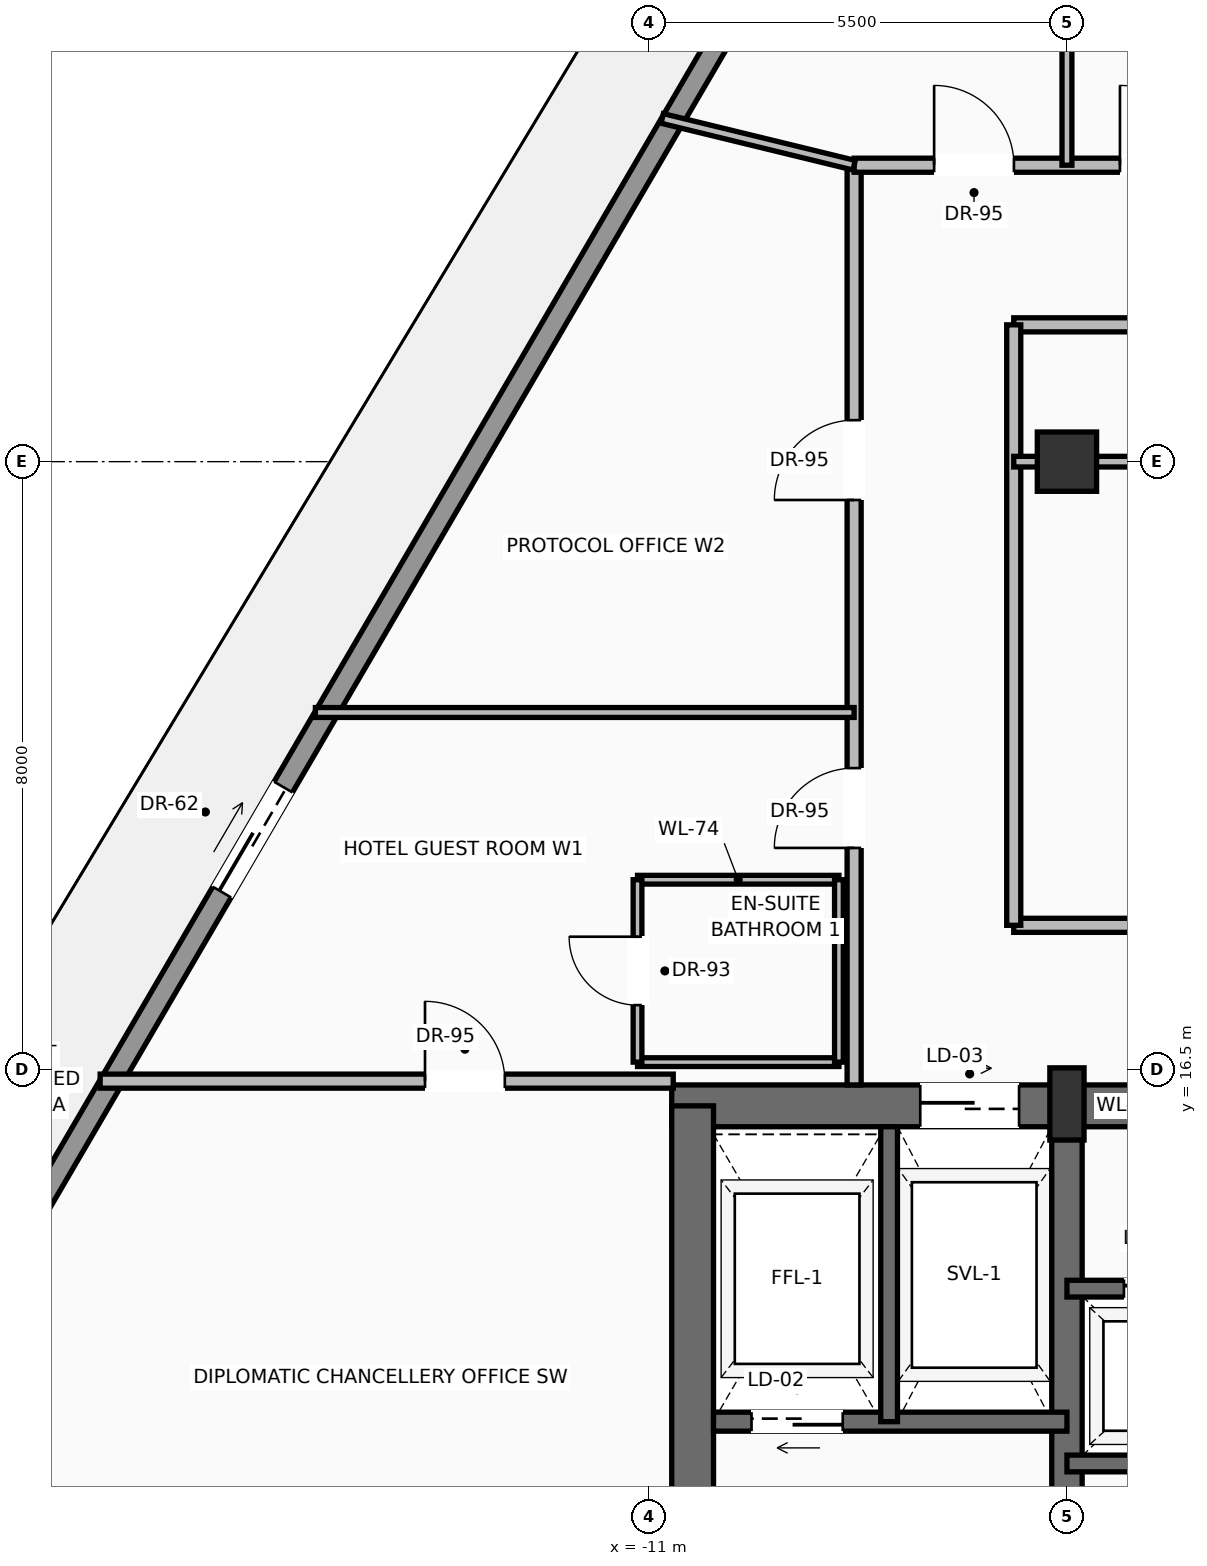
"""IFC4 building model, lengths in metres.
Left out: names, types, materials, properties, quantities, classifications, styles, units other than length and angle.
Written with IfcOpenShell. Run it as: python <this file> out.ifc"""

import sys

from ifc_helpers import new_model, si_unit, direction, frame, frame_2d, origin, origin_2d, place, context, subcontext, project, spatial, rectangle, extrude, source, transform, mapped, element, fill, save


model = new_model("IFC4")
c1 = context("Model", 3, precision=1e-05, world=origin(), true_north=direction((0.0, 1.0)))
c2 = subcontext(c1, "Body", "Model", "MODEL_VIEW")
j1 = project(units=[si_unit("LENGTHUNIT", "METRE"), si_unit("PLANEANGLEUNIT", "RADIAN")], contexts=[c1])
p1 = place(None, origin())
s1 = spatial("IfcSite", under=j1, at=p1, CompositionType="ELEMENT")
p2 = place(p1, origin())
s2 = spatial("IfcBuilding", under=s1, at=p2, CompositionType="ELEMENT")
p3 = place(p2, frame((0.0, 0.0, 254.5)))
s3 = spatial("IfcBuildingStorey", under=s2, at=p3, CompositionType="ELEMENT", Elevation=254.5)
p4 = place(p3, frame((-10.7, 16.025, 0.0), z_axis=(0.0, 0.0, 1.0), x_axis=(1.0, 0.0, 0.0)))
e1 = element("IfcWall", 1, at=p4, inside=s3, PredefinedType="SHEAR", context=c2, shape_type="SweptSolid", body=[
    extrude(rectangle(XDim=21.4, YDim=0.55, at=frame_2d((10.7, 0.0))), origin(), (0.0, 0.0, 1.0), 3.15),
])
p5 = place(p4, frame((3.27, 0.0, 0.0)))
e2 = element("IfcOpeningElement", 2, at=p5, cuts=e1, PredefinedType="OPENING", context=c2, shape_type="SweptSolid", body=[
    extrude(rectangle(XDim=1.3, YDim=2.3, at=frame_2d((0.65, 1.15))), frame((0.0, 0.285, 0.0), z_axis=(0.0, -1.0, 0.0), x_axis=(1.0, 0.0, 0.0)), (0.0, 0.0, 1.0), 0.57),
])
p6 = place(p4, frame((9.7, 0.0, 0.0)))
e3 = element("IfcOpeningElement", 3, at=p6, cuts=e1, PredefinedType="OPENING", context=c2, shape_type="SweptSolid", body=[
    extrude(rectangle(XDim=2.0, YDim=2.4, at=frame_2d((1.0, 1.2))), frame((0.0, 0.285, 0.0), z_axis=(0.0, -1.0, 0.0), x_axis=(1.0, 0.0, 0.0)), (0.0, 0.0, 1.0), 0.57),
])
p7 = place(p3, frame((-10.425, 0.575, 0.0), z_axis=(0.0, 0.0, 1.0), x_axis=(0.0, 1.0, 0.0)))
e4 = element("IfcWall", 4, at=p7, inside=s3, PredefinedType="SHEAR", context=c2, shape_type="SweptSolid", body=[
    extrude(rectangle(XDim=15.45, YDim=0.55, at=frame_2d((7.725, 0.0))), origin(), (0.0, 0.0, 1.0), 3.15),
])
p8 = place(p3, frame((-5.5, 0.575, 0.0), z_axis=(0.0, 0.0, 1.0), x_axis=(0.0, 1.0, 0.0)))
e5 = element("IfcWall", 5, at=p8, inside=s3, PredefinedType="SHEAR", context=c2, shape_type="SweptSolid", body=[
    extrude(rectangle(XDim=15.45, YDim=0.4, at=frame_2d((7.725, 0.0))), origin(), (0.0, 0.0, 1.0), 3.15),
])
p9 = place(p8, frame((8.925, 0.0, 0.0)))
e6 = element("IfcOpeningElement", 6, at=p9, cuts=e5, PredefinedType="OPENING", context=c2, shape_type="SweptSolid", body=[
    extrude(rectangle(XDim=1.1, YDim=2.2, at=frame_2d((0.55, 1.1))), frame((0.0, 0.21, 0.0), z_axis=(0.0, -1.0, 0.0), x_axis=(1.0, 0.0, 0.0)), (0.0, 0.0, 1.0), 0.42),
])
m1 = source(origin(), c2, "Body", "SweptSolid", [
    extrude(rectangle(XDim=0.45, YDim=0.95, at=origin_2d()), origin(), (0.0, 0.0, 1.0), 3.45),
])
p10 = place(p3, frame((-5.5, 16.05, 0.0), z_axis=(0.0, 0.0, 1.0), x_axis=(1.0, 0.0, 0.0)))
e7 = element("IfcColumn", 7, at=p10, inside=s3, PredefinedType="PILASTER", context=c2, shape_type="MappedRepresentation", body=[
    mapped(m1, transform((0.0, 0.0, 0.0), scale=1.0)),
])
m2 = source(origin(), c2, "Body", "SweptSolid", [
    extrude(rectangle(XDim=0.78, YDim=0.78, at=origin_2d()), origin(), (0.0, 0.0, 1.0), 3.45),
])
p11 = place(p3, frame((-5.5, 24.5, 0.0), z_axis=(0.0, 0.0, 1.0), x_axis=(1.0, 0.0, 0.0)))
e8 = element("IfcColumn", 8, at=p11, inside=s3, PredefinedType="COLUMN", context=c2, shape_type="MappedRepresentation", body=[
    mapped(m2, transform((0.0, 0.0, 0.0), scale=1.0)),
])
p12 = place(p3, frame((-19.013, 14.734, 0.0), z_axis=(0.0, 0.0, 1.0), x_axis=(0.504219118022, 0.863575752914, 0.0)))
e9 = element("IfcWall", 9, at=p12, inside=s3, PredefinedType="SOLIDWALL", context=c2, shape_type="SweptSolid", body=[
    extrude(rectangle(XDim=19.796, YDim=0.28, at=frame_2d((9.898, 0.0))), origin(), (0.0, 0.0, 1.0), 2.73),
])
p13 = place(p12, frame((4.751, 0.0, 0.0)))
e10 = element("IfcOpeningElement", 10, at=p13, cuts=e9, PredefinedType="OPENING", context=c2, shape_type="SweptSolid", body=[
    extrude(rectangle(XDim=1.6, YDim=2.35, at=frame_2d((0.8, 1.175))), frame((0.0, 0.15, 0.0), z_axis=(0.0, -1.0, 0.0), x_axis=(1.0, 0.0, 0.0)), (0.0, 0.0, 1.0), 0.3),
])
p14 = place(p3, frame((-5.5, 11.87, 0.0), z_axis=(0.0, 0.0, 1.0), x_axis=(-1.0, 0.0, 0.0)))
e11 = element("IfcWall", 11, at=p14, inside=s3, PredefinedType="SOLIDWALL", context=c2, shape_type="SweptSolid", body=[
    extrude(rectangle(XDim=4.65, YDim=0.25, at=frame_2d((2.325, 0.0))), origin(), (0.0, 0.0, 1.0), 3.15),
])
p15 = place(p14, frame((2.95, 0.0, 0.0)))
e12 = element("IfcOpeningElement", 12, at=p15, cuts=e11, PredefinedType="OPENING", context=c2, shape_type="SweptSolid", body=[
    extrude(rectangle(XDim=1.2, YDim=2.25, at=frame_2d((0.6, 1.125))), frame((0.0, 0.135, 0.0), z_axis=(0.0, -1.0, 0.0), x_axis=(1.0, 0.0, 0.0)), (0.0, 0.0, 1.0), 0.27),
])
p16 = place(p3, frame((-7.84, 11.87, 0.0), z_axis=(0.0, 0.0, 1.0), x_axis=(0.0, 1.0, 0.0)))
e13 = element("IfcWall", 13, at=p16, inside=s3, PredefinedType="SOLIDWALL", context=c2, shape_type="SweptSolid", body=[
    extrude(rectangle(XDim=3.88, YDim=0.22, at=frame_2d((1.94, 0.0))), origin(), (0.0, 0.0, 1.0), 3.15),
])
p17 = place(p3, frame((-5.5, 11.32, 0.0), z_axis=(0.0, 0.0, 1.0), x_axis=(1.0, 0.0, 0.0)))
e14 = element("IfcWall", 14, at=p17, inside=s3, PredefinedType="SOLIDWALL", context=c2, shape_type="SweptSolid", body=[
    extrude(rectangle(XDim=7.32, YDim=0.22, at=frame_2d((3.66, 0.0))), origin(), (0.0, 0.0, 1.0), 3.15),
])
p18 = place(p3, frame((-5.5, 13.62, 0.0), z_axis=(0.0, 0.0, 1.0), x_axis=(1.0, 0.0, 0.0)))
e15 = element("IfcWall", 15, at=p18, inside=s3, PredefinedType="SOLIDWALL", context=c2, shape_type="SweptSolid", body=[
    extrude(rectangle(XDim=7.32, YDim=0.22, at=frame_2d((3.66, 0.0))), origin(), (0.0, 0.0, 1.0), 3.15),
])
p19 = place(p18, frame((0.75, 0.0, 0.0)))
e16 = element("IfcOpeningElement", 16, at=p19, cuts=e15, PredefinedType="OPENING", context=c2, shape_type="SweptSolid", body=[
    extrude(rectangle(XDim=1.1, YDim=2.2, at=frame_2d((0.55, 1.1))), frame((0.0, 0.12, 0.0), z_axis=(0.0, -1.0, 0.0), x_axis=(1.0, 0.0, 0.0)), (0.0, 0.0, 1.0), 0.24),
])
p20 = place(p18, frame((3.15, 0.0, 0.0)))
e17 = element("IfcOpeningElement", 17, at=p20, cuts=e15, PredefinedType="OPENING", context=c2, shape_type="SweptSolid", body=[
    extrude(rectangle(XDim=1.1, YDim=2.2, at=frame_2d((0.55, 1.1))), frame((0.0, 0.12, 0.0), z_axis=(0.0, -1.0, 0.0), x_axis=(1.0, 0.0, 0.0)), (0.0, 0.0, 1.0), 0.24),
])
p21 = place(p18, frame((5.55, 0.0, 0.0)))
e18 = element("IfcOpeningElement", 18, at=p21, cuts=e15, PredefinedType="OPENING", context=c2, shape_type="SweptSolid", body=[
    extrude(rectangle(XDim=1.1, YDim=2.2, at=frame_2d((0.55, 1.1))), frame((0.0, 0.12, 0.0), z_axis=(0.0, -1.0, 0.0), x_axis=(1.0, 0.0, 0.0)), (0.0, 0.0, 1.0), 0.24),
])
p22 = place(p3, frame((-6.2, 18.4, 0.0), z_axis=(0.0, 0.0, 1.0), x_axis=(1.0, 0.0, 0.0)))
e19 = element("IfcWall", 19, at=p22, inside=s3, PredefinedType="PARTITIONING", context=c2, shape_type="SweptSolid", body=[
    extrude(rectangle(XDim=12.6, YDim=0.185, at=frame_2d((6.3, 0.0))), origin(), (0.0, 0.0, 1.0), 3.142),
])
p23 = place(p22, frame((5.825, 0.0, 0.0)))
e20 = element("IfcOpeningElement", 20, at=p23, cuts=e19, PredefinedType="OPENING", context=c2, shape_type="SweptSolid", body=[
    extrude(rectangle(XDim=0.95, YDim=2.2, at=frame_2d((0.475, 1.1))), frame((0.0, 0.103, 0.0), z_axis=(0.0, -1.0, 0.0), x_axis=(1.0, 0.0, 0.0)), (0.0, 0.0, 1.0), 0.205),
])
p24 = place(p3, frame((-6.2, 26.3, 0.0), z_axis=(0.0, 0.0, 1.0), x_axis=(1.0, 0.0, 0.0)))
e21 = element("IfcWall", 21, at=p24, inside=s3, PredefinedType="PARTITIONING", context=c2, shape_type="SweptSolid", body=[
    extrude(rectangle(XDim=12.6, YDim=0.185, at=frame_2d((6.3, 0.0))), origin(), (0.0, 0.0, 1.0), 3.142),
])
p25 = place(p24, frame((5.825, 0.0, 0.0)))
e22 = element("IfcOpeningElement", 22, at=p25, cuts=e21, PredefinedType="OPENING", context=c2, shape_type="SweptSolid", body=[
    extrude(rectangle(XDim=0.95, YDim=2.2, at=frame_2d((0.475, 1.1))), frame((0.0, 0.103, 0.0), z_axis=(0.0, -1.0, 0.0), x_axis=(1.0, 0.0, 0.0)), (0.0, 0.0, 1.0), 0.205),
])
p26 = place(p3, frame((-6.2, 18.4, 0.0), z_axis=(0.0, 0.0, 1.0), x_axis=(0.0, 1.0, 0.0)))
e23 = element("IfcWall", 23, at=p26, inside=s3, PredefinedType="PARTITIONING", context=c2, shape_type="SweptSolid", body=[
    extrude(rectangle(XDim=7.9, YDim=0.185, at=frame_2d((3.95, 0.0))), origin(), (0.0, 0.0, 1.0), 3.142),
])
p27 = place(p3, frame((-8.3, 16.3, 0.0), z_axis=(0.0, 0.0, 1.0), x_axis=(0.0, 1.0, 0.0)))
e24 = element("IfcWall", 24, at=p27, inside=s3, PredefinedType="PARTITIONING", context=c2, shape_type="SweptSolid", body=[
    extrude(rectangle(XDim=12.1, YDim=0.185, at=frame_2d((6.05, 0.0))), origin(), (0.0, 0.0, 1.0), 3.142),
])
p28 = place(p27, frame((3.118, 0.0, 0.0)))
e25 = element("IfcOpeningElement", 25, at=p28, cuts=e24, PredefinedType="OPENING", context=c2, shape_type="SweptSolid", body=[
    extrude(rectangle(XDim=1.05, YDim=2.25, at=frame_2d((0.525, 1.125))), frame((0.0, 0.103, 0.0), z_axis=(0.0, -1.0, 0.0), x_axis=(1.0, 0.0, 0.0)), (0.0, 0.0, 1.0), 0.205),
])
p29 = place(p27, frame((7.696, 0.0, 0.0)))
e26 = element("IfcOpeningElement", 26, at=p29, cuts=e24, PredefinedType="OPENING", context=c2, shape_type="SweptSolid", body=[
    extrude(rectangle(XDim=1.05, YDim=2.25, at=frame_2d((0.525, 1.125))), frame((0.0, 0.103, 0.0), z_axis=(0.0, -1.0, 0.0), x_axis=(1.0, 0.0, 0.0)), (0.0, 0.0, 1.0), 0.205),
])
p30 = place(p3, frame((-8.3, 28.4, 0.0), z_axis=(0.0, 0.0, 1.0), x_axis=(1.0, 0.0, 0.0)))
e27 = element("IfcWall", 27, at=p30, inside=s3, PredefinedType="PARTITIONING", context=c2, shape_type="SweptSolid", body=[
    extrude(rectangle(XDim=16.8, YDim=0.185, at=frame_2d((8.4, 0.0))), origin(), (0.0, 0.0, 1.0), 3.142),
])
p31 = place(p30, frame((3.498, 0.0, 0.0)))
e28 = element("IfcOpeningElement", 28, at=p31, cuts=e27, PredefinedType="OPENING", context=c2, shape_type="SweptSolid", body=[
    extrude(rectangle(XDim=1.05, YDim=2.25, at=frame_2d((0.525, 1.125))), frame((0.0, 0.103, 0.0), z_axis=(0.0, -1.0, 0.0), x_axis=(1.0, 0.0, 0.0)), (0.0, 0.0, 1.0), 0.205),
])
p32 = place(p30, frame((8.998, 0.0, 0.0)))
e29 = element("IfcOpeningElement", 29, at=p32, cuts=e27, PredefinedType="OPENING", context=c2, shape_type="SweptSolid", body=[
    extrude(rectangle(XDim=1.05, YDim=2.25, at=frame_2d((0.525, 1.125))), frame((0.0, 0.103, 0.0), z_axis=(0.0, -1.0, 0.0), x_axis=(1.0, 0.0, 0.0)), (0.0, 0.0, 1.0), 0.205),
])
p33 = place(p30, frame((12.052, 0.0, 0.0)))
e30 = element("IfcOpeningElement", 30, at=p33, cuts=e27, PredefinedType="OPENING", context=c2, shape_type="SweptSolid", body=[
    extrude(rectangle(XDim=1.05, YDim=2.25, at=frame_2d((0.525, 1.125))), frame((0.0, 0.103, 0.0), z_axis=(0.0, -1.0, 0.0), x_axis=(1.0, 0.0, 0.0)), (0.0, 0.0, 1.0), 0.205),
])
p34 = place(p30, frame((14.498, 0.0, 0.0)))
e31 = element("IfcOpeningElement", 31, at=p34, cuts=e27, PredefinedType="OPENING", context=c2, shape_type="SweptSolid", body=[
    extrude(rectangle(XDim=1.05, YDim=2.25, at=frame_2d((0.525, 1.125))), frame((0.0, 0.103, 0.0), z_axis=(0.0, -1.0, 0.0), x_axis=(1.0, 0.0, 0.0)), (0.0, 0.0, 1.0), 0.205),
])
p35 = place(p30, frame((1.052, 0.0, 0.0)))
e32 = element("IfcOpeningElement", 32, at=p35, cuts=e27, PredefinedType="OPENING", context=c2, shape_type="SweptSolid", body=[
    extrude(rectangle(XDim=1.05, YDim=2.25, at=frame_2d((0.525, 1.125))), frame((0.0, 0.103, 0.0), z_axis=(0.0, -1.0, 0.0), x_axis=(1.0, 0.0, 0.0)), (0.0, 0.0, 1.0), 0.205),
])
p36 = place(p3, frame((-6.2, 24.5, 0.0), z_axis=(0.0, 0.0, 1.0), x_axis=(1.0, 0.0, 0.0)))
e33 = element("IfcWall", 33, at=p36, inside=s3, PredefinedType="PARTITIONING", context=c2, shape_type="SweptSolid", body=[
    extrude(rectangle(XDim=12.6, YDim=0.14, at=frame_2d((6.3, 0.0))), origin(), (0.0, 0.0, 1.0), 2.593),
])
p37 = place(p3, frame((-18.22, 16.35, 0.0), z_axis=(0.0, 0.0, 1.0), x_axis=(1.0, 0.0, 0.0)))
e34 = element("IfcWall", 34, at=p37, inside=s3, PredefinedType="PARTITIONING", context=c2, shape_type="SweptSolid", body=[
    extrude(rectangle(XDim=7.54, YDim=0.185, at=frame_2d((3.77, 0.0))), origin(), (0.0, 0.0, 1.0), 3.142),
])
p38 = place(p37, frame((4.274, 0.0, 0.0)))
e35 = element("IfcOpeningElement", 35, at=p38, cuts=e34, PredefinedType="OPENING", context=c2, shape_type="SweptSolid", body=[
    extrude(rectangle(XDim=1.05, YDim=2.25, at=frame_2d((0.525, 1.125))), frame((0.0, 0.103, 0.0), z_axis=(0.0, -1.0, 0.0), x_axis=(1.0, 0.0, 0.0)), (0.0, 0.0, 1.0), 0.205),
])
p39 = place(p3, frame((-10.825, 29.015, 0.0), z_axis=(0.0, 0.0, 1.0), x_axis=(0.971578327302, -0.236718300764, 0.0)))
e36 = element("IfcWall", 36, at=p39, inside=s3, PredefinedType="PARTITIONING", context=c2, shape_type="SweptSolid", body=[
    extrude(rectangle(XDim=2.599, YDim=0.13, at=frame_2d((1.3, 0.0))), origin(), (0.0, 0.0, 1.0), 3.142),
])
p40 = place(p3, frame((-5.5, 28.4, 0.0), z_axis=(0.0, 0.0, 1.0), x_axis=(0.0, 1.0, 0.0)))
e37 = element("IfcWall", 37, at=p40, inside=s3, PredefinedType="PARTITIONING", context=c2, shape_type="SweptSolid", body=[
    extrude(rectangle(XDim=9.736, YDim=0.13, at=frame_2d((4.868, 0.0))), origin(), (0.0, 0.0, 1.0), 2.593),
])
for number, where, z_axis, x_axis in (
    (38, (-11.15, 16.6, 0.0), (0.0, 0.0, 1.0), (1.0, 0.0, 0.0)),
    (39, (-11.15, 19.0, 0.0), (0.0, 0.0, 1.0), (1.0, 0.0, 0.0)),
):
    element("IfcWall", number, at=place(p3, frame(where, z_axis=z_axis, x_axis=x_axis)), inside=s3, PredefinedType="PARTITIONING", context=c2, shape_type="SweptSolid", body=[
        extrude(rectangle(XDim=2.65, YDim=0.115, at=frame_2d((1.325, 0.0))), origin(), (0.0, 0.0, 1.0), 3.142),
    ])
p41 = place(p3, frame((-11.15, 16.6, 0.0), z_axis=(0.0, 0.0, 1.0), x_axis=(0.0, 1.0, 0.0)))
e40 = element("IfcWall", 40, at=p41, inside=s3, PredefinedType="PARTITIONING", context=c2, shape_type="SweptSolid", body=[
    extrude(rectangle(XDim=2.4, YDim=0.115, at=frame_2d((1.2, 0.0))), origin(), (0.0, 0.0, 1.0), 3.142),
])
p42 = place(p41, frame((0.75, 0.0, 0.0)))
e41 = element("IfcOpeningElement", 41, at=p42, cuts=e40, PredefinedType="OPENING", context=c2, shape_type="SweptSolid", body=[
    extrude(rectangle(XDim=0.9, YDim=2.15, at=frame_2d((0.45, 1.075))), frame((0.0, 0.067, 0.0), z_axis=(0.0, -1.0, 0.0), x_axis=(1.0, 0.0, 0.0)), (0.0, 0.0, 1.0), 0.135),
])
p43 = place(p3, frame((-8.5, 16.6, 0.0), z_axis=(0.0, 0.0, 1.0), x_axis=(0.0, 1.0, 0.0)))
e42 = element("IfcWall", 42, at=p43, inside=s3, PredefinedType="PARTITIONING", context=c2, shape_type="SweptSolid", body=[
    extrude(rectangle(XDim=2.4, YDim=0.115, at=frame_2d((1.2, 0.0))), origin(), (0.0, 0.0, 1.0), 3.142),
])
p44 = place(p3, frame((-15.388, 21.2, 0.0), z_axis=(0.0, 0.0, 1.0), x_axis=(1.0, 0.0, 0.0)))
e43 = element("IfcWall", 43, at=p44, inside=s3, PredefinedType="PARTITIONING", context=c2, shape_type="SweptSolid", body=[
    extrude(rectangle(XDim=7.088, YDim=0.13, at=frame_2d((3.544, 0.0))), origin(), (0.0, 0.0, 1.0), 3.142),
])
m3 = source(origin(), c2, "Body", "SweptSolid", [
    extrude(rectangle(XDim=1.6, YDim=2.35, at=frame_2d((0.8, 1.175))), frame((0.0, 0.025, 0.0), z_axis=(0.0, -1.0, 0.0), x_axis=(1.0, 0.0, 0.0)), (0.0, 0.0, 1.0), 0.05),
])
p45 = place(p13, origin())
e44 = element("IfcDoor", 44, at=p45, inside=s3, OperationType="SLIDING_TO_LEFT", PredefinedType="DOOR", context=c2, shape_type="MappedRepresentation", body=[
    mapped(m3, transform((0.0, 0.0, 0.0), scale=1.0)),
])
fill(e10, e44)
m4 = source(origin(), c2, "Body", "SweptSolid", [
    extrude(rectangle(XDim=1.2, YDim=2.25, at=frame_2d((0.6, 1.125))), frame((0.0, 0.025, 0.0), z_axis=(0.0, -1.0, 0.0), x_axis=(1.0, 0.0, 0.0)), (0.0, 0.0, 1.0), 0.05),
])
p46 = place(p15, origin())
e45 = element("IfcDoor", 45, at=p46, inside=s3, OperationType="SLIDING_TO_LEFT", PredefinedType="DOOR", context=c2, shape_type="MappedRepresentation", body=[
    mapped(m4, transform((0.0, 0.0, 0.0), scale=1.0)),
])
fill(e12, e45)
m5 = source(origin(), c2, "Body", "SweptSolid", [
    extrude(rectangle(XDim=1.3, YDim=2.3, at=frame_2d((0.65, 1.15))), frame((0.0, 0.025, 0.0), z_axis=(0.0, -1.0, 0.0), x_axis=(1.0, 0.0, 0.0)), (0.0, 0.0, 1.0), 0.05),
])
p47 = place(p5, origin())
e46 = element("IfcDoor", 46, at=p47, inside=s3, OperationType="SLIDING_TO_RIGHT", PredefinedType="DOOR", context=c2, shape_type="MappedRepresentation", body=[
    mapped(m5, transform((0.0, 0.0, 0.0), scale=1.0)),
])
fill(e2, e46)
m6 = source(origin(), c2, "Body", "SweptSolid", [
    extrude(rectangle(XDim=1.1, YDim=2.2, at=frame_2d((0.55, 1.1))), frame((0.0, 0.025, 0.0), z_axis=(0.0, -1.0, 0.0), x_axis=(1.0, 0.0, 0.0)), (0.0, 0.0, 1.0), 0.05),
])
p48 = place(p19, origin())
e47 = element("IfcDoor", 47, at=p48, inside=s3, OperationType="SLIDING_TO_RIGHT", PredefinedType="DOOR", context=c2, shape_type="MappedRepresentation", body=[
    mapped(m6, transform((0.0, 0.0, 0.0), scale=1.0)),
])
fill(e16, e47)
m7 = source(origin(), c2, "Body", "SweptSolid", [
    extrude(rectangle(XDim=1.05, YDim=2.25, at=frame_2d((0.525, 1.125))), frame((0.0, 0.025, 0.0), z_axis=(0.0, -1.0, 0.0), x_axis=(1.0, 0.0, 0.0)), (0.0, 0.0, 1.0), 0.05),
])
p49 = place(p38, origin())
e48 = element("IfcDoor", 48, at=p49, inside=s3, OperationType="SINGLE_SWING_LEFT", PredefinedType="DOOR", context=c2, shape_type="MappedRepresentation", body=[
    mapped(m7, transform((0.0, 0.0, 0.0), scale=1.0)),
])
fill(e35, e48)
p50 = place(p28, origin())
e49 = element("IfcDoor", 49, at=p50, inside=s3, OperationType="SINGLE_SWING_LEFT", PredefinedType="DOOR", context=c2, shape_type="MappedRepresentation", body=[
    mapped(m7, transform((0.0, 0.0, 0.0), scale=1.0)),
])
fill(e25, e49)
m8 = source(origin(), c2, "Body", "SweptSolid", [
    extrude(rectangle(XDim=0.9, YDim=2.15, at=frame_2d((0.45, 1.075))), frame((0.0, 0.025, 0.0), z_axis=(0.0, -1.0, 0.0), x_axis=(1.0, 0.0, 0.0)), (0.0, 0.0, 1.0), 0.05),
])
p51 = place(p42, origin())
e50 = element("IfcDoor", 50, at=p51, inside=s3, OperationType="SINGLE_SWING_RIGHT", PredefinedType="DOOR", context=c2, shape_type="MappedRepresentation", body=[
    mapped(m8, transform((0.0, 0.0, 0.0), scale=1.0)),
])
fill(e41, e50)
p52 = place(p29, origin())
e51 = element("IfcDoor", 51, at=p52, inside=s3, OperationType="SINGLE_SWING_LEFT", PredefinedType="DOOR", context=c2, shape_type="MappedRepresentation", body=[
    mapped(m7, transform((0.0, 0.0, 0.0), scale=1.0)),
])
fill(e26, e51)
p53 = place(p31, origin())
e52 = element("IfcDoor", 52, at=p53, inside=s3, OperationType="SINGLE_SWING_LEFT", PredefinedType="DOOR", context=c2, shape_type="MappedRepresentation", body=[
    mapped(m7, transform((0.0, 0.0, 0.0), scale=1.0)),
])
fill(e28, e52)
p54 = place(p35, origin())
e53 = element("IfcDoor", 53, at=p54, inside=s3, OperationType="SINGLE_SWING_LEFT", PredefinedType="DOOR", context=c2, shape_type="MappedRepresentation", body=[
    mapped(m7, transform((0.0, 0.0, 0.0), scale=1.0)),
])
fill(e32, e53)
save(model, sys.argv[1])
